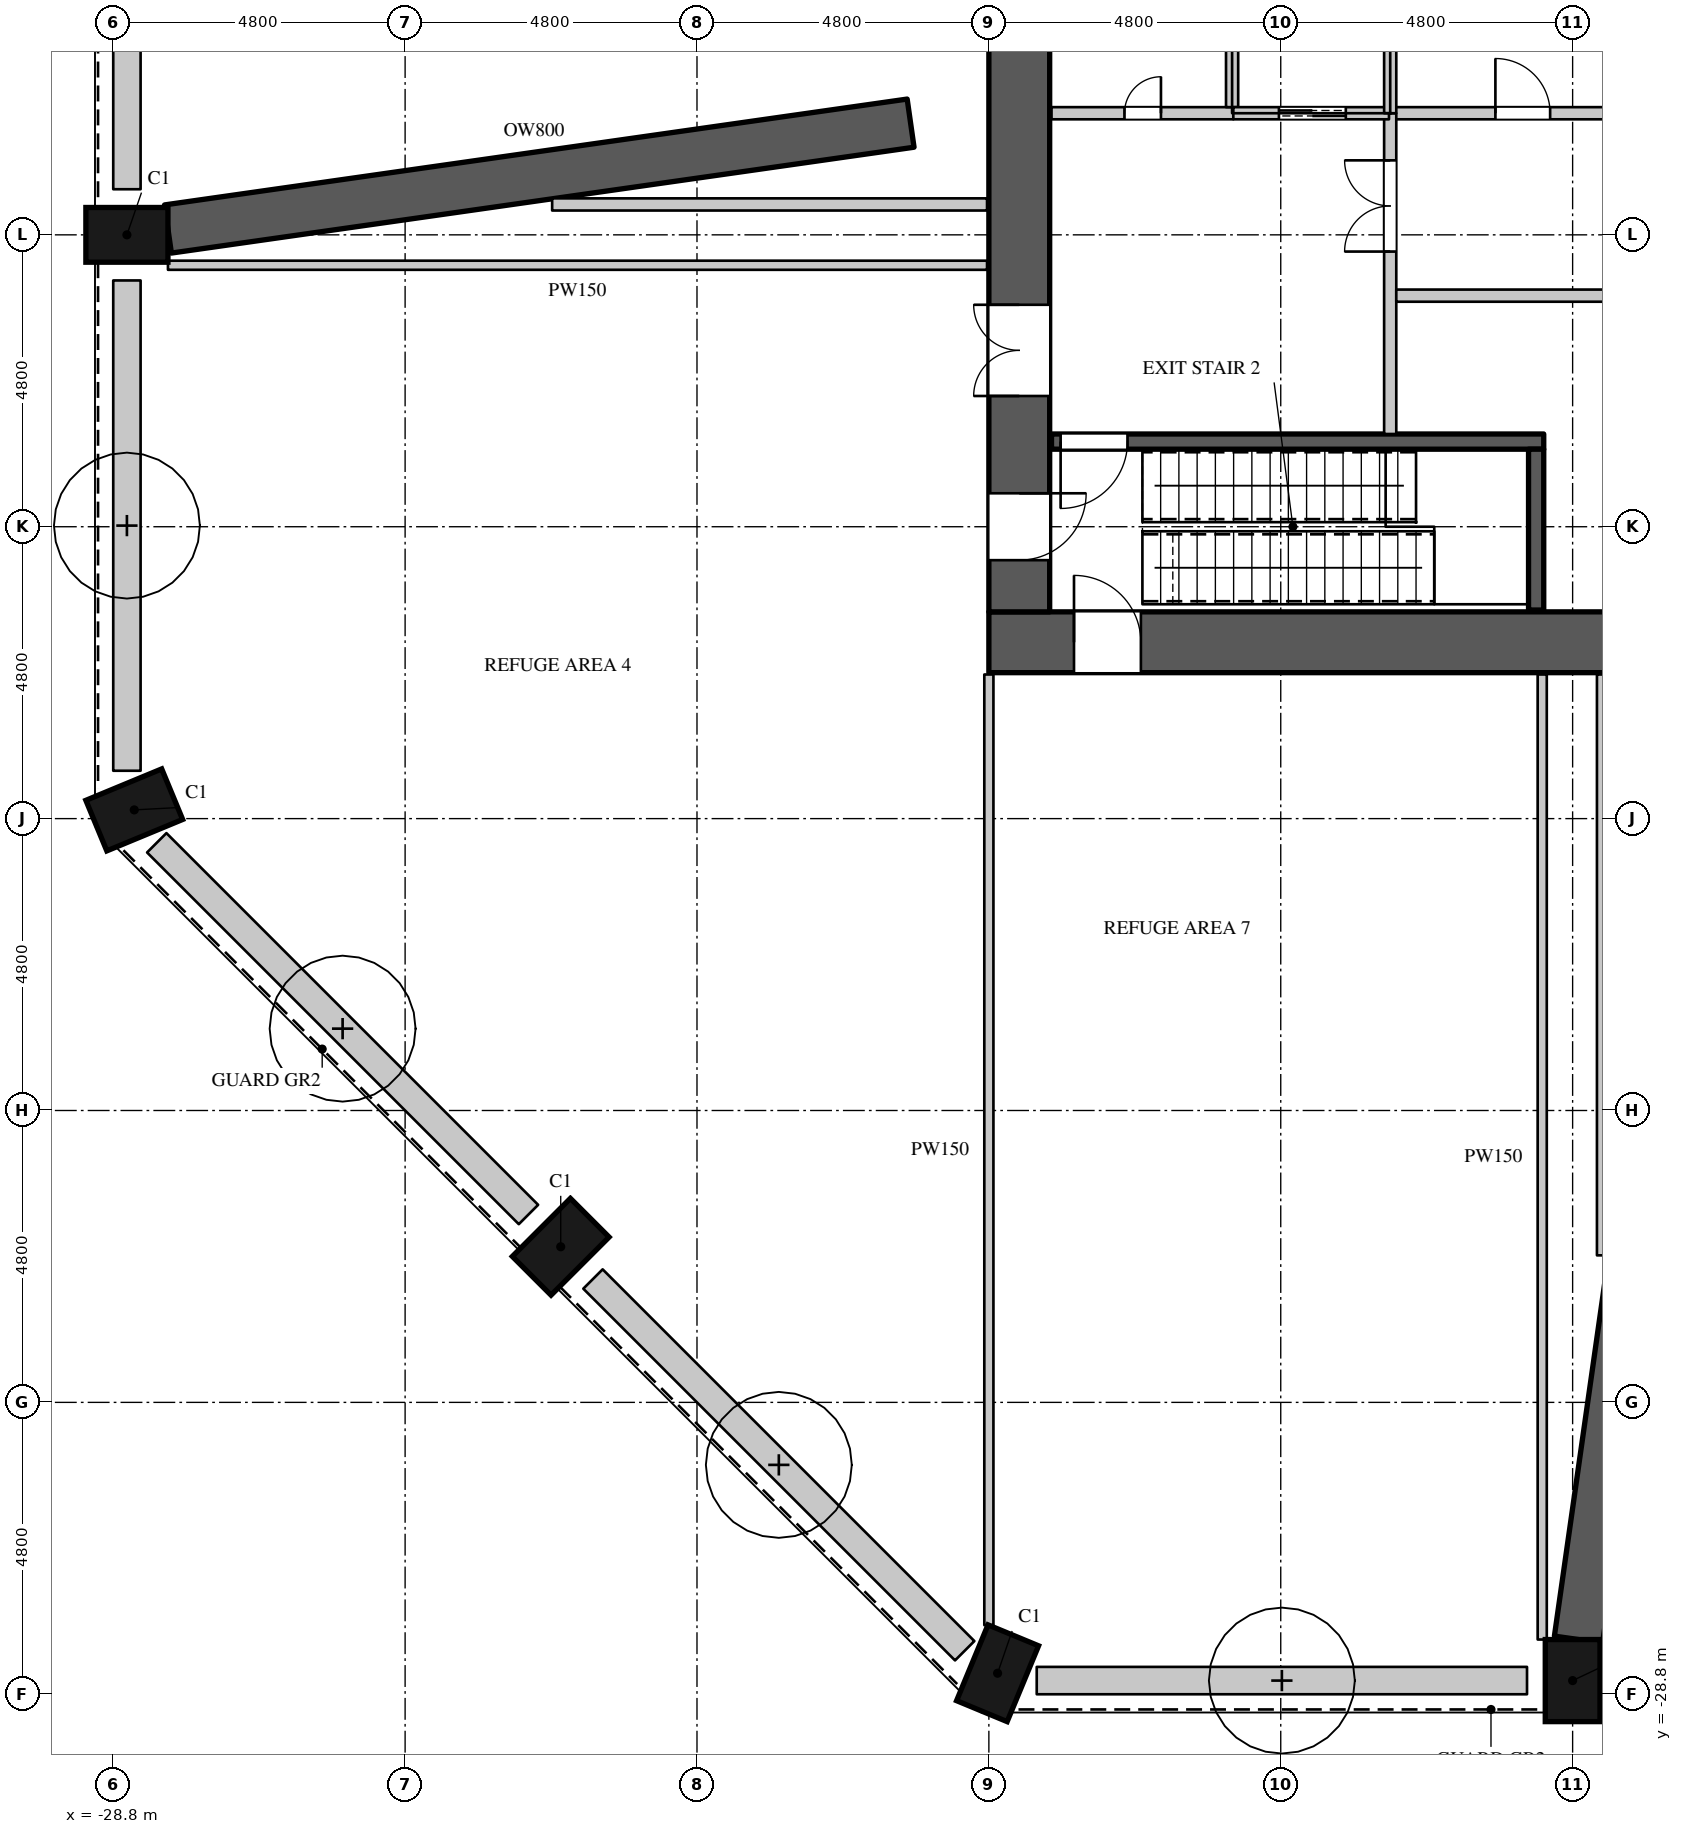
"""IFC4 building model, lengths in metres.
Left out: names, types, materials, properties, quantities, classifications, styles, units other than length and angle.
Written with IfcOpenShell. Run it as: python <this file> out.ifc"""

import sys

from ifc_helpers import new_model, si_unit, direction, frame, frame_2d, origin, origin_2d, place, context, subcontext, project, spatial, rectangle, extrude, element, fill, save


model = new_model("IFC4")
c1 = context("Model", 3, precision=1e-05, world=origin(), true_north=direction((0.0, 1.0)))
c2 = subcontext(c1, "Body", "Model", "MODEL_VIEW")
j1 = project(units=[si_unit("LENGTHUNIT", "METRE"), si_unit("PLANEANGLEUNIT", "RADIAN")], contexts=[c1])
p1 = place(None, origin())
s1 = spatial("IfcSite", under=j1, at=p1, CompositionType="ELEMENT")
p2 = place(p1, origin())
s2 = spatial("IfcBuilding", under=s1, at=p2, CompositionType="ELEMENT")
p3 = place(p2, frame((0.0, 0.0, 101.1)))
s3 = spatial("IfcBuildingStorey", under=s2, at=p3, CompositionType="ELEMENT", Elevation=101.1)
for number, where, z_axis, x_axis in (
    (1, (-28.575, -4.8, 0.0), (0.0, 0.0, 1.0), (0.0, -1.0, 0.0)),
    (2, (-28.454, -14.257, 0.0), (0.0, 0.0, 1.0), (0.383, -0.924, 0.0)),
    (3, (-21.441, -21.441, 0.0), (0.0, 0.0, 1.0), (0.707, -0.707, 0.0)),
    (4, (-14.257, -28.454, 0.0), (0.0, 0.0, 1.0), (0.924, -0.383, 0.0)),
    (5, (-4.8, -28.575, 0.0), (0.0, 0.0, 1.0), (1.0, 0.0, 0.0)),
):
    element("IfcColumn", number, at=place(p3, frame(where, z_axis=z_axis, x_axis=x_axis)), inside=s3, PredefinedType="COLUMN", context=c2, shape_type="SweptSolid", body=[
        extrude(rectangle(XDim=0.9, YDim=1.35, at=origin_2d()), origin(), (0.0, 0.0, 1.0), 5.4),
    ])
p4 = place(p3, frame((-15.687, -2.963, 0.0), z_axis=(0.0, 0.0, 1.0), x_axis=(-0.989994565366, -0.141105494384, 0.0)))
e6 = element("IfcWall", 6, at=p4, inside=s3, PredefinedType="SHEAR", context=c2, shape_type="SweptSolid", body=[
    extrude(rectangle(XDim=12.336, YDim=0.8, at=frame_2d((6.168, 0.0))), origin(), (0.0, 0.0, 1.0), 3.35),
])
p5 = place(p3, frame((-2.621, -13.287, 0.0), z_axis=(0.0, 0.0, 1.0), x_axis=(-0.141104108698, -0.989994762869, 0.0)))
e7 = element("IfcWall", 7, at=p5, inside=s3, PredefinedType="SHEAR", context=c2, shape_type="SweptSolid", body=[
    extrude(rectangle(XDim=14.76, YDim=0.8, at=frame_2d((7.38, 0.0))), origin(), (0.0, 0.0, 1.0), 3.15),
])
p6 = place(p3, frame((-28.575, 4.05, 0.0), z_axis=(0.0, 0.0, 1.0), x_axis=(0.0, -1.0, 0.0)))
e8 = element("IfcWall", 8, at=p6, inside=s3, PredefinedType="USERDEFINED", context=c2, shape_type="SweptSolid", body=[
    extrude(rectangle(XDim=8.1, YDim=0.45, at=frame_2d((4.05, 0.0))), origin(), (0.0, 0.0, 1.0), 0.9),
])
p7 = place(p3, frame((-28.575, -5.55, 0.0), z_axis=(0.0, 0.0, 1.0), x_axis=(0.0, -1.0, 0.0)))
e9 = element("IfcWall", 9, at=p7, inside=s3, PredefinedType="USERDEFINED", context=c2, shape_type="SweptSolid", body=[
    extrude(rectangle(XDim=8.063, YDim=0.45, at=frame_2d((4.031, 0.0))), origin(), (0.0, 0.0, 1.0), 0.9),
])
for number, where, z_axis, x_axis in (
    (10, (-28.084, -14.797, 0.0), (0.0, 0.0, 1.0), (0.707, -0.707, 0.0)),
    (11, (-20.911, -21.971, 0.0), (0.0, 0.0, 1.0), (0.707, -0.707, 0.0)),
):
    element("IfcWall", number, at=place(p3, frame(where, z_axis=z_axis, x_axis=x_axis)), inside=s3, PredefinedType="USERDEFINED", context=c2, shape_type="SweptSolid", body=[
        extrude(rectangle(XDim=8.646, YDim=0.45, at=frame_2d((4.323, 0.0))), origin(), (0.0, 0.0, 1.0), 0.9),
    ])
p8 = place(p3, frame((-13.613, -28.575, 0.0), z_axis=(0.0, 0.0, 1.0), x_axis=(1.0, 0.0, 0.0)))
e12 = element("IfcWall", 12, at=p8, inside=s3, PredefinedType="USERDEFINED", context=c2, shape_type="SweptSolid", body=[
    extrude(rectangle(XDim=8.063, YDim=0.45, at=frame_2d((4.031, 0.0))), origin(), (0.0, 0.0, 1.0), 0.9),
])
p9 = place(p3, frame((-14.4, -11.5, 0.0), z_axis=(0.0, 0.0, 1.0), x_axis=(1.0, 0.0, 0.0)))
e13 = element("IfcWall", 13, at=p9, inside=s3, PredefinedType="SHEAR", context=c2, shape_type="SweptSolid", body=[
    extrude(rectangle(XDim=28.8, YDim=1.0, at=frame_2d((14.4, 0.0))), origin(), (0.0, 0.0, 1.0), 5.4),
])
p10 = place(p9, frame((1.4, 0.0, 0.0)))
e14 = element("IfcOpeningElement", 14, at=p10, cuts=e13, PredefinedType="OPENING", context=c2, shape_type="SweptSolid", body=[
    extrude(rectangle(XDim=1.1, YDim=2.2, at=frame_2d((0.55, 1.1))), frame((0.0, 0.51, 0.0), z_axis=(0.0, -1.0, 0.0), x_axis=(1.0, 0.0, 0.0)), (0.0, 0.0, 1.0), 1.02),
])
p11 = place(p9, frame((26.3, 0.0, 0.0)))
e15 = element("IfcOpeningElement", 15, at=p11, cuts=e13, PredefinedType="OPENING", context=c2, shape_type="SweptSolid", body=[
    extrude(rectangle(XDim=1.1, YDim=2.2, at=frame_2d((0.55, 1.1))), frame((0.0, 0.51, 0.0), z_axis=(0.0, -1.0, 0.0), x_axis=(1.0, 0.0, 0.0)), (0.0, 0.0, 1.0), 1.02),
])
p12 = place(p9, frame((13.5, 0.0, 0.0)))
e16 = element("IfcOpeningElement", 16, at=p12, cuts=e13, PredefinedType="OPENING", context=c2, shape_type="SweptSolid", body=[
    extrude(rectangle(XDim=1.8, YDim=2.4, at=frame_2d((0.9, 1.2))), frame((0.0, 0.51, 0.0), z_axis=(0.0, -1.0, 0.0), x_axis=(1.0, 0.0, 0.0)), (0.0, 0.0, 1.0), 1.02),
])
p13 = place(p3, frame((-13.9, -11.0, 0.0), z_axis=(0.0, 0.0, 1.0), x_axis=(0.0, 1.0, 0.0)))
e17 = element("IfcWall", 17, at=p13, inside=s3, PredefinedType="SHEAR", context=c2, shape_type="SweptSolid", body=[
    extrude(rectangle(XDim=22.0, YDim=1.0, at=frame_2d((11.0, 0.0))), origin(), (0.0, 0.0, 1.0), 5.4),
])
p14 = place(p13, frame((16.9, 0.0, 0.0)))
e18 = element("IfcOpeningElement", 18, at=p14, cuts=e17, PredefinedType="OPENING", context=c2, shape_type="SweptSolid", body=[
    extrude(rectangle(XDim=1.5, YDim=2.4, at=frame_2d((0.75, 1.2))), frame((0.0, 0.51, 0.0), z_axis=(0.0, -1.0, 0.0), x_axis=(1.0, 0.0, 0.0)), (0.0, 0.0, 1.0), 1.02),
])
p15 = place(p13, frame((20.05, 0.0, 0.0)))
e19 = element("IfcOpeningElement", 19, at=p15, cuts=e17, PredefinedType="OPENING", context=c2, shape_type="SweptSolid", body=[
    extrude(rectangle(XDim=1.1, YDim=2.2, at=frame_2d((0.55, 1.1))), frame((0.0, 0.51, 0.0), z_axis=(0.0, -1.0, 0.0), x_axis=(1.0, 0.0, 0.0)), (0.0, 0.0, 1.0), 1.02),
])
p16 = place(p13, frame((14.15, 0.0, 0.0)))
e20 = element("IfcOpeningElement", 20, at=p16, cuts=e17, PredefinedType="OPENING", context=c2, shape_type="SweptSolid", body=[
    extrude(rectangle(XDim=0.9, YDim=2.2, at=frame_2d((0.45, 1.1))), frame((0.0, 0.51, 0.0), z_axis=(0.0, -1.0, 0.0), x_axis=(1.0, 0.0, 0.0)), (0.0, 0.0, 1.0), 1.02),
])
p17 = place(p13, frame((3.55, 0.0, 0.0)))
e21 = element("IfcOpeningElement", 21, at=p17, cuts=e17, PredefinedType="OPENING", context=c2, shape_type="SweptSolid", body=[
    extrude(rectangle(XDim=1.5, YDim=2.4, at=frame_2d((0.75, 1.2))), frame((0.0, 0.51, 0.0), z_axis=(0.0, -1.0, 0.0), x_axis=(1.0, 0.0, 0.0)), (0.0, 0.0, 1.0), 1.02),
])
p18 = place(p13, frame((0.85, 0.0, 0.0)))
e22 = element("IfcOpeningElement", 22, at=p18, cuts=e17, PredefinedType="OPENING", context=c2, shape_type="SweptSolid", body=[
    extrude(rectangle(XDim=1.1, YDim=2.2, at=frame_2d((0.55, 1.1))), frame((0.0, 0.51, 0.0), z_axis=(0.0, -1.0, 0.0), x_axis=(1.0, 0.0, 0.0)), (0.0, 0.0, 1.0), 1.02),
])
p19 = place(p3, frame((-7.82, -2.8, 0.0), z_axis=(0.0, 0.0, 1.0), x_axis=(1.0, 0.0, 0.0)))
e23 = element("IfcWall", 23, at=p19, inside=s3, PredefinedType="PARTITIONING", context=c2, shape_type="SweptSolid", body=[
    extrude(rectangle(XDim=4.44, YDim=0.2, at=frame_2d((2.22, 0.0))), origin(), (0.0, 0.0, 1.0), 5.15),
])
p20 = place(p19, frame((1.75, 0.0, 0.0)))
e24 = element("IfcOpeningElement", 24, at=p20, cuts=e23, PredefinedType="OPENING", context=c2, shape_type="SweptSolid", body=[
    extrude(rectangle(XDim=0.9, YDim=2.2, at=frame_2d((0.45, 1.1))), frame((0.0, 0.11, 0.0), z_axis=(0.0, -1.0, 0.0), x_axis=(1.0, 0.0, 0.0)), (0.0, 0.0, 1.0), 0.22),
])
p21 = place(p3, frame((-7.8, -8.075, 0.0), z_axis=(0.0, 0.0, 1.0), x_axis=(0.0, 1.0, 0.0)))
e25 = element("IfcWall", 25, at=p21, inside=s3, PredefinedType="PARTITIONING", context=c2, shape_type="SweptSolid", body=[
    extrude(rectangle(XDim=5.275, YDim=0.2, at=frame_2d((2.637, 0.0))), origin(), (0.0, 0.0, 1.0), 5.15),
])
p22 = place(p21, frame((3.0, 0.0, 0.0)))
e26 = element("IfcOpeningElement", 26, at=p22, cuts=e25, PredefinedType="OPENING", context=c2, shape_type="SweptSolid", body=[
    extrude(rectangle(XDim=1.5, YDim=2.4, at=frame_2d((0.75, 1.2))), frame((0.0, 0.11, 0.0), z_axis=(0.0, -1.0, 0.0), x_axis=(1.0, 0.0, 0.0)), (0.0, 0.0, 1.0), 0.22),
])
p23 = place(p3, frame((-7.7, -5.8, 0.0), z_axis=(0.0, 0.0, 1.0), x_axis=(1.0, 0.0, 0.0)))
e27 = element("IfcWall", 27, at=p23, inside=s3, PredefinedType="PARTITIONING", context=c2, shape_type="SweptSolid", body=[
    extrude(rectangle(XDim=21.07, YDim=0.2, at=frame_2d((10.535, 0.0))), origin(), (0.0, 0.0, 1.0), 5.15),
])
p24 = place(p23, frame((6.15, 0.0, 0.0)))
e28 = element("IfcOpeningElement", 28, at=p24, cuts=e27, PredefinedType="OPENING", context=c2, shape_type="SweptSolid", body=[
    extrude(rectangle(XDim=0.9, YDim=2.2, at=frame_2d((0.45, 1.1))), frame((0.0, 0.11, 0.0), z_axis=(0.0, -1.0, 0.0), x_axis=(1.0, 0.0, 0.0)), (0.0, 0.0, 1.0), 0.22),
])
p25 = place(p23, frame((16.55, 0.0, 0.0)))
e29 = element("IfcOpeningElement", 29, at=p25, cuts=e27, PredefinedType="OPENING", context=c2, shape_type="SweptSolid", body=[
    extrude(rectangle(XDim=0.9, YDim=2.2, at=frame_2d((0.45, 1.1))), frame((0.0, 0.11, 0.0), z_axis=(0.0, -1.0, 0.0), x_axis=(1.0, 0.0, 0.0)), (0.0, 0.0, 1.0), 0.22),
])
p26 = place(p3, frame((-27.9, -5.3, 0.0), z_axis=(0.0, 0.0, 1.0), x_axis=(1.0, 0.0, 0.0)))
e30 = element("IfcWall", 30, at=p26, inside=s3, PredefinedType="PARTITIONING", context=c2, shape_type="SweptSolid", body=[
    extrude(rectangle(XDim=13.47, YDim=0.15, at=frame_2d((6.735, 0.0))), origin(), (0.0, 0.0, 1.0), 5.15),
])
p27 = place(p3, frame((-14.4, -27.664, 0.0), z_axis=(0.0, 0.0, 1.0), x_axis=(0.0, 1.0, 0.0)))
e31 = element("IfcWall", 31, at=p27, inside=s3, PredefinedType="PARTITIONING", context=c2, shape_type="SweptSolid", body=[
    extrude(rectangle(XDim=15.634, YDim=0.15, at=frame_2d((7.817, 0.0))), origin(), (0.0, 0.0, 1.0), 5.15),
])
p28 = place(p3, frame((-5.3, -27.9, 0.0), z_axis=(0.0, 0.0, 1.0), x_axis=(0.0, 1.0, 0.0)))
e32 = element("IfcWall", 32, at=p28, inside=s3, PredefinedType="PARTITIONING", context=c2, shape_type="SweptSolid", body=[
    extrude(rectangle(XDim=15.87, YDim=0.15, at=frame_2d((7.935, 0.0))), origin(), (0.0, 0.0, 1.0), 5.15),
])
p29 = place(p3, frame((-21.582, -4.3, 0.0), z_axis=(0.0, 0.0, 1.0), x_axis=(1.0, 0.0, 0.0)))
e33 = element("IfcWall", 33, at=p29, inside=s3, PredefinedType="PARTITIONING", context=c2, shape_type="SweptSolid", body=[
    extrude(rectangle(XDim=7.152, YDim=0.2, at=frame_2d((3.576, 0.0))), origin(), (0.0, 0.0, 1.0), 5.15),
])
p30 = place(p3, frame((-13.37, -2.8, 0.0), z_axis=(0.0, 0.0, 1.0), x_axis=(1.0, 0.0, 0.0)))
e34 = element("IfcWall", 34, at=p30, inside=s3, PredefinedType="PARTITIONING", context=c2, shape_type="SweptSolid", body=[
    extrude(rectangle(XDim=2.99, YDim=0.2, at=frame_2d((1.495, 0.0))), origin(), (0.0, 0.0, 1.0), 5.15),
])
p31 = place(p30, frame((1.2, 0.0, 0.0)))
e35 = element("IfcOpeningElement", 35, at=p31, cuts=e34, PredefinedType="OPENING", context=c2, shape_type="SweptSolid", body=[
    extrude(rectangle(XDim=0.6, YDim=2.0, at=frame_2d((0.3, 1.0))), frame((0.0, 0.11, 0.0), z_axis=(0.0, -1.0, 0.0), x_axis=(1.0, 0.0, 0.0)), (0.0, 0.0, 1.0), 0.22),
])
p32 = place(p3, frame((-4.3, -21.582, 0.0), z_axis=(0.0, 0.0, 1.0), x_axis=(0.0, 1.0, 0.0)))
e36 = element("IfcWall", 36, at=p32, inside=s3, PredefinedType="PARTITIONING", context=c2, shape_type="SweptSolid", body=[
    extrude(rectangle(XDim=9.552, YDim=0.2, at=frame_2d((4.776, 0.0))), origin(), (0.0, 0.0, 1.0), 5.15),
])
p33 = place(p3, frame((-10.4, -2.7, 0.0), z_axis=(0.0, 0.0, 1.0), x_axis=(0.0, 1.0, 0.0)))
e37 = element("IfcWall", 37, at=p33, inside=s3, PredefinedType="PARTITIONING", context=c2, shape_type="SweptSolid", body=[
    extrude(rectangle(XDim=2.7, YDim=0.2, at=frame_2d((1.35, 0.0))), origin(), (0.0, 0.0, 1.0), 5.15),
])
p34 = place(p3, frame((-10.38, -2.8, 0.0), z_axis=(0.0, 0.0, 1.0), x_axis=(1.0, 0.0, 0.0)))
e38 = element("IfcWall", 38, at=p34, inside=s3, PredefinedType="PARTITIONING", context=c2, shape_type="SweptSolid", body=[
    extrude(rectangle(XDim=2.56, YDim=0.2, at=frame_2d((1.28, 0.0))), origin(), (0.0, 0.0, 1.0), 5.15),
])
p35 = place(p34, frame((0.75, 0.0, 0.0)))
e39 = element("IfcOpeningElement", 39, at=p35, cuts=e38, PredefinedType="OPENING", context=c2, shape_type="SweptSolid", body=[
    extrude(rectangle(XDim=1.1, YDim=2.2, at=frame_2d((0.55, 1.1))), frame((0.0, 0.11, 0.0), z_axis=(0.0, -1.0, 0.0), x_axis=(1.0, 0.0, 0.0)), (0.0, 0.0, 1.0), 0.22),
])
p36 = place(p3, frame((-7.8, -2.8, 0.0), z_axis=(0.0, 0.0, 1.0), x_axis=(0.0, 1.0, 0.0)))
e40 = element("IfcWall", 40, at=p36, inside=s3, PredefinedType="PARTITIONING", context=c2, shape_type="SweptSolid", body=[
    extrude(rectangle(XDim=2.8, YDim=0.2, at=frame_2d((1.4, 0.0))), origin(), (0.0, 0.0, 1.0), 5.15),
])
p37 = place(p3, frame((-13.37, -8.2, 0.0), z_axis=(0.0, 0.0, 1.0), x_axis=(1.0, 0.0, 0.0)))
e41 = element("IfcWall", 41, at=p37, inside=s3, PredefinedType="SHEAR", context=c2, shape_type="SweptSolid", body=[
    extrude(rectangle(XDim=8.095, YDim=0.25, at=frame_2d((4.048, 0.0))), origin(), (0.0, 0.0, 1.0), 5.15),
])
p38 = place(p37, frame((0.15, 0.0, 0.0)))
e42 = element("IfcOpeningElement", 42, at=p38, cuts=e41, PredefinedType="OPENING", context=c2, shape_type="SweptSolid", body=[
    extrude(rectangle(XDim=1.1, YDim=2.2, at=frame_2d((0.55, 1.1))), frame((0.0, 0.135, 0.0), z_axis=(0.0, -1.0, 0.0), x_axis=(1.0, 0.0, 0.0)), (0.0, 0.0, 1.0), 0.27),
])
p39 = place(p3, frame((-5.4, -10.97, 0.0), z_axis=(0.0, 0.0, 1.0), x_axis=(0.0, 1.0, 0.0)))
e43 = element("IfcWall", 43, at=p39, inside=s3, PredefinedType="SHEAR", context=c2, shape_type="SweptSolid", body=[
    extrude(rectangle(XDim=2.645, YDim=0.25, at=frame_2d((1.323, 0.0))), origin(), (0.0, 0.0, 1.0), 5.15),
])
p40 = place(p31, origin())
e44 = element("IfcDoor", 44, at=p40, inside=s3, OperationType="SINGLE_SWING_RIGHT", PredefinedType="DOOR", context=c2, shape_type="SweptSolid", body=[
    extrude(rectangle(XDim=0.6, YDim=2.0, at=frame_2d((0.3, 1.0))), frame((0.0, 0.025, 0.0), z_axis=(0.0, -1.0, 0.0), x_axis=(1.0, 0.0, 0.0)), (0.0, 0.0, 1.0), 0.05),
])
fill(e35, e44)
p41 = place(p20, origin())
e45 = element("IfcDoor", 45, at=p41, inside=s3, OperationType="SINGLE_SWING_LEFT", PredefinedType="DOOR", context=c2, shape_type="SweptSolid", body=[
    extrude(rectangle(XDim=0.9, YDim=2.2, at=frame_2d((0.45, 1.1))), frame((0.0, 0.025, 0.0), z_axis=(0.0, -1.0, 0.0), x_axis=(1.0, 0.0, 0.0)), (0.0, 0.0, 1.0), 0.05),
])
fill(e24, e45)
p42 = place(p35, origin())
e46 = element("IfcDoor", 46, at=p42, inside=s3, OperationType="DOUBLE_DOOR_SLIDING", PredefinedType="DOOR", context=c2, shape_type="SweptSolid", body=[
    extrude(rectangle(XDim=1.1, YDim=2.2, at=frame_2d((0.55, 1.1))), frame((0.0, 0.025, 0.0), z_axis=(0.0, -1.0, 0.0), x_axis=(1.0, 0.0, 0.0)), (0.0, 0.0, 1.0), 0.05),
])
fill(e39, e46)
p43 = place(p38, origin())
e47 = element("IfcDoor", 47, at=p43, inside=s3, OperationType="SINGLE_SWING_RIGHT", PredefinedType="DOOR", context=c2, shape_type="SweptSolid", body=[
    extrude(rectangle(XDim=1.1, YDim=2.2, at=frame_2d((0.55, 1.1))), frame((0.0, 0.025, 0.0), z_axis=(0.0, -1.0, 0.0), x_axis=(1.0, 0.0, 0.0)), (0.0, 0.0, 1.0), 0.05),
])
fill(e42, e47)
p44 = place(p22, origin())
e48 = element("IfcDoor", 48, at=p44, inside=s3, OperationType="DOUBLE_DOOR_SINGLE_SWING", PredefinedType="DOOR", context=c2, shape_type="SweptSolid", body=[
    extrude(rectangle(XDim=1.5, YDim=2.4, at=frame_2d((0.75, 1.2))), frame((0.0, 0.025, 0.0), z_axis=(0.0, -1.0, 0.0), x_axis=(1.0, 0.0, 0.0)), (0.0, 0.0, 1.0), 0.05),
])
fill(e26, e48)
p45 = place(p10, origin())
e49 = element("IfcDoor", 49, at=p45, inside=s3, OperationType="SINGLE_SWING_LEFT", PredefinedType="DOOR", context=c2, shape_type="SweptSolid", body=[
    extrude(rectangle(XDim=1.1, YDim=2.2, at=frame_2d((0.55, 1.1))), frame((0.0, 0.495, 0.0), z_axis=(0.0, -1.0, 0.0), x_axis=(1.0, 0.0, 0.0)), (0.0, 0.0, 1.0), 0.05),
])
fill(e14, e49)
p46 = place(p17, origin())
e50 = element("IfcDoor", 50, at=p46, inside=s3, OperationType="DOUBLE_DOOR_SINGLE_SWING", PredefinedType="DOOR", context=c2, shape_type="SweptSolid", body=[
    extrude(rectangle(XDim=1.5, YDim=2.4, at=frame_2d((0.75, 1.2))), frame((0.0, 0.495, 0.0), z_axis=(0.0, -1.0, 0.0), x_axis=(1.0, 0.0, 0.0)), (0.0, 0.0, 1.0), 0.05),
])
fill(e21, e50)
p47 = place(p18, origin())
e51 = element("IfcDoor", 51, at=p47, inside=s3, OperationType="SINGLE_SWING_LEFT", PredefinedType="DOOR", context=c2, shape_type="SweptSolid", body=[
    extrude(rectangle(XDim=1.1, YDim=2.2, at=frame_2d((0.55, 1.1))), frame((0.0, -0.445, 0.0), z_axis=(0.0, -1.0, 0.0), x_axis=(1.0, 0.0, 0.0)), (0.0, 0.0, 1.0), 0.05),
])
fill(e22, e51)
save(model, sys.argv[1])
